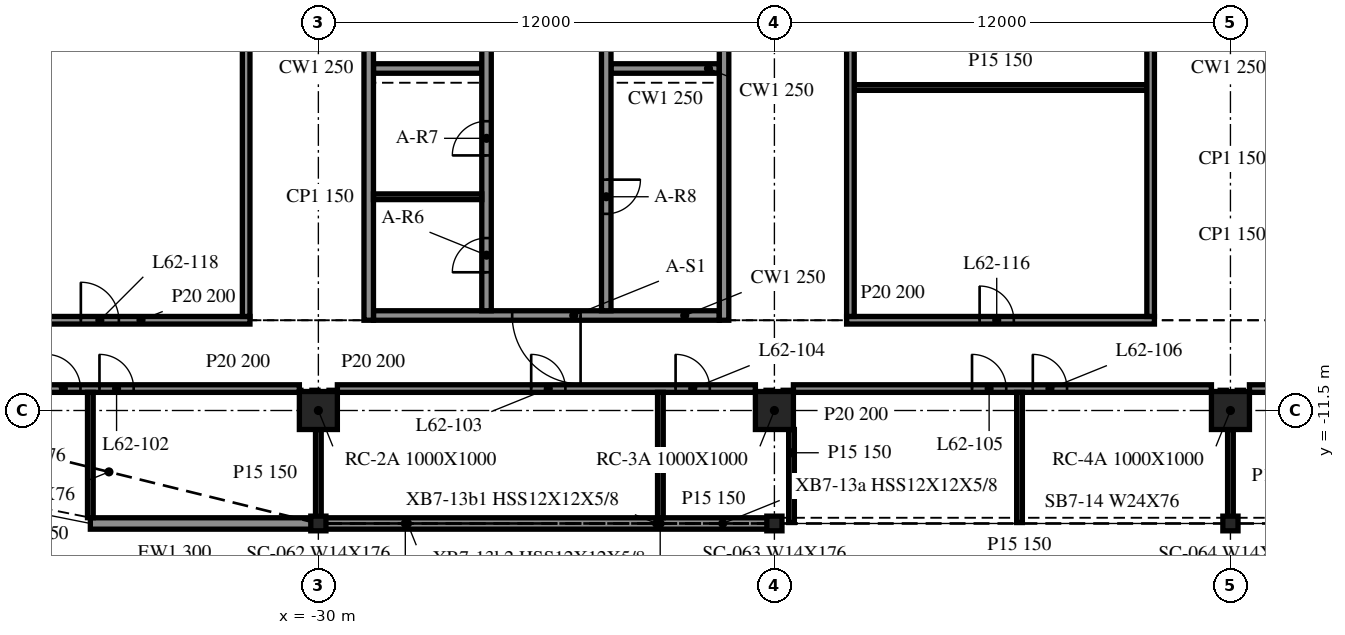
"""IFC4 building model, lengths in metres.
Left out: names, types, materials, properties, quantities, classifications, styles, units other than length and angle.
Written with IfcOpenShell. Run it as: python <this file> out.ifc"""

import sys

from ifc_helpers import new_model, si_unit, direction, frame, frame_2d, origin, origin_2d, place, context, subcontext, project, spatial, rectangle, i_section, extrude, element, fill, save


model = new_model("IFC4")
c1 = context("Model", 3, precision=1e-05, world=origin(), true_north=direction((0.0, 1.0)))
c2 = subcontext(c1, "Body", "Model", "MODEL_VIEW")
j1 = project(units=[si_unit("LENGTHUNIT", "METRE"), si_unit("PLANEANGLEUNIT", "RADIAN")], contexts=[c1])
p1 = place(None, origin())
s1 = spatial("IfcSite", under=j1, at=p1, CompositionType="ELEMENT")
p2 = place(p1, origin())
s2 = spatial("IfcBuilding", under=s1, at=p2, CompositionType="ELEMENT")
p3 = place(p2, frame((0.0, 0.0, 255.2)))
s3 = spatial("IfcBuildingStorey", under=s2, at=p3, CompositionType="ELEMENT", Elevation=255.2)
for number, where, z_axis, x_axis in (
    (1, (-30.0, -11.5, -0.34), (0.0, 0.0, 1.0), (1.0, 0.0, 0.0)),
    (2, (-18.0, -11.5, -0.34), (0.0, 0.0, 1.0), (1.0, 0.0, 0.0)),
    (3, (-6.0, -11.5, -0.34), (0.0, 0.0, 1.0), (1.0, 0.0, 0.0)),
):
    element("IfcColumn", number, at=place(p3, frame(where, z_axis=z_axis, x_axis=x_axis)), inside=s3, PredefinedType="COLUMN", context=c2, shape_type="SweptSolid", body=[
        extrude(rectangle(XDim=1.0, YDim=1.0, at=origin_2d()), origin(), (0.0, 0.0, 1.0), 3.74),
    ])
for number, where, z_axis, x_axis in (
    (4, (-30.0, -14.473, -0.34), (0.0, 0.0, 1.0), (1.0, 0.0, 0.0)),
    (5, (-18.0, -14.473, -0.34), (0.0, 0.0, 1.0), (1.0, 0.0, 0.0)),
    (6, (-6.0, -14.473, -0.34), (0.0, 0.0, 1.0), (1.0, 0.0, 0.0)),
):
    element("IfcColumn", number, at=place(p3, frame(where, z_axis=z_axis, x_axis=x_axis)), inside=s3, PredefinedType="COLUMN", context=c2, shape_type="SweptSolid", body=[
        extrude(i_section(OverallWidth=0.399, OverallDepth=0.386, WebThickness=0.021, FlangeThickness=0.033, at=origin_2d()), origin(), (0.0, 0.0, 1.0), 3.74),
    ])
p4 = place(p3, frame((-36.0, -14.473, 0.0), z_axis=(0.0, 0.0, 1.0), x_axis=(1.0, 0.0, 0.0)))
e7 = element("IfcWall", 7, at=p4, inside=s3, PredefinedType="NOTDEFINED", context=c2, shape_type="SweptSolid", body=[
    extrude(rectangle(XDim=5.99, YDim=0.3, at=frame_2d((2.995, 0.0))), origin(), (0.0, 0.0, 1.0), 3.4),
])
p5 = place(p3, frame((-29.99, -14.473, 0.0), z_axis=(0.0, 0.0, 1.0), x_axis=(1.0, 0.0, 0.0)))
e8 = element("IfcWall", 8, at=p5, inside=s3, PredefinedType="NOTDEFINED", context=c2, shape_type="SweptSolid", body=[
    extrude(rectangle(XDim=11.979, YDim=0.3, at=frame_2d((5.99, 0.0))), origin(), (0.0, 0.0, 1.0), 3.4),
])
for number, where, z_axis, x_axis in (
    (9, (-28.675, 15.125, 0.0), (0.0, 0.0, 1.0), (0.0, -1.0, 0.0)),
    (10, (-19.325, -9.125, 0.0), (0.0, 0.0, 1.0), (0.0, 1.0, 0.0)),
):
    element("IfcWall", number, at=place(p3, frame(where, z_axis=z_axis, x_axis=x_axis)), inside=s3, PredefinedType="SOLIDWALL", context=c2, shape_type="SweptSolid", body=[
        extrude(rectangle(XDim=24.25, YDim=0.25, at=frame_2d((12.125, 0.0))), origin(), (0.0, 0.0, 1.0), 3.4),
    ])
p6 = place(p3, frame((-19.45, -9.0, 0.0), z_axis=(0.0, 0.0, 1.0), x_axis=(-1.0, 0.0, 0.0)))
e11 = element("IfcWall", 11, at=p6, inside=s3, PredefinedType="SOLIDWALL", context=c2, shape_type="SweptSolid", body=[
    extrude(rectangle(XDim=9.1, YDim=0.25, at=frame_2d((4.55, 0.0))), origin(), (0.0, 0.0, 1.0), 3.4),
])
p7 = place(p6, frame((3.65, 0.0, 0.0)))
e12 = element("IfcOpeningElement", 12, at=p7, cuts=e11, PredefinedType="OPENING", context=c2, shape_type="SweptSolid", body=[
    extrude(rectangle(XDim=1.8, YDim=2.1, at=frame_2d((0.9, 1.05))), frame((0.0, 0.135, 0.0), z_axis=(0.0, -1.0, 0.0), x_axis=(1.0, 0.0, 0.0)), (0.0, 0.0, 1.0), 0.27),
])
p8 = place(p3, frame((-25.575, -8.875, 0.0), z_axis=(0.0, 0.0, 1.0), x_axis=(0.0, 1.0, 0.0)))
e13 = element("IfcWall", 13, at=p8, inside=s3, PredefinedType="SOLIDWALL", context=c2, shape_type="SweptSolid", body=[
    extrude(rectangle(XDim=17.5, YDim=0.25, at=frame_2d((8.75, 0.0))), origin(), (0.0, 0.0, 1.0), 3.4),
])
p9 = place(p8, frame((8.7, 0.0, 0.0)))
e14 = element("IfcOpeningElement", 14, at=p9, cuts=e13, PredefinedType="OPENING", context=c2, shape_type="SweptSolid", body=[
    extrude(rectangle(XDim=0.9, YDim=2.1, at=frame_2d((0.45, 1.05))), frame((0.0, 0.135, 0.0), z_axis=(0.0, -1.0, 0.0), x_axis=(1.0, 0.0, 0.0)), (0.0, 0.0, 1.0), 0.27),
])
p10 = place(p8, frame((14.15, 0.0, 0.0)))
e15 = element("IfcOpeningElement", 15, at=p10, cuts=e13, PredefinedType="OPENING", context=c2, shape_type="SweptSolid", body=[
    extrude(rectangle(XDim=0.9, YDim=2.1, at=frame_2d((0.45, 1.05))), frame((0.0, 0.135, 0.0), z_axis=(0.0, -1.0, 0.0), x_axis=(1.0, 0.0, 0.0)), (0.0, 0.0, 1.0), 0.27),
])
p11 = place(p8, frame((1.012, 0.0, 0.0)))
e16 = element("IfcOpeningElement", 16, at=p11, cuts=e13, PredefinedType="OPENING", context=c2, shape_type="SweptSolid", body=[
    extrude(rectangle(XDim=0.9, YDim=2.1, at=frame_2d((0.45, 1.05))), frame((0.0, 0.135, 0.0), z_axis=(0.0, -1.0, 0.0), x_axis=(1.0, 0.0, 0.0)), (0.0, 0.0, 1.0), 0.27),
])
p12 = place(p8, frame((4.087, 0.0, 0.0)))
e17 = element("IfcOpeningElement", 17, at=p12, cuts=e13, PredefinedType="OPENING", context=c2, shape_type="SweptSolid", body=[
    extrude(rectangle(XDim=0.9, YDim=2.1, at=frame_2d((0.45, 1.05))), frame((0.0, 0.135, 0.0), z_axis=(0.0, -1.0, 0.0), x_axis=(1.0, 0.0, 0.0)), (0.0, 0.0, 1.0), 0.27),
])
p13 = place(p3, frame((-22.425, 14.875, 0.0), z_axis=(0.0, 0.0, 1.0), x_axis=(0.0, -1.0, 0.0)))
e18 = element("IfcWall", 18, at=p13, inside=s3, PredefinedType="SOLIDWALL", context=c2, shape_type="SweptSolid", body=[
    extrude(rectangle(XDim=23.75, YDim=0.25, at=frame_2d((11.875, 0.0))), origin(), (0.0, 0.0, 1.0), 3.4),
])
p14 = place(p13, frame((15.225, 0.0, 0.0)))
e19 = element("IfcOpeningElement", 19, at=p14, cuts=e18, PredefinedType="OPENING", context=c2, shape_type="SweptSolid", body=[
    extrude(rectangle(XDim=0.9, YDim=2.1, at=frame_2d((0.45, 1.05))), frame((0.0, 0.135, 0.0), z_axis=(0.0, -1.0, 0.0), x_axis=(1.0, 0.0, 0.0)), (0.0, 0.0, 1.0), 0.27),
])
p15 = place(p13, frame((11.425, 0.0, 0.0)))
e20 = element("IfcOpeningElement", 20, at=p15, cuts=e18, PredefinedType="OPENING", context=c2, shape_type="SweptSolid", body=[
    extrude(rectangle(XDim=0.9, YDim=2.1, at=frame_2d((0.45, 1.05))), frame((0.0, 0.135, 0.0), z_axis=(0.0, -1.0, 0.0), x_axis=(1.0, 0.0, 0.0)), (0.0, 0.0, 1.0), 0.27),
])
p16 = place(p13, frame((7.625, 0.0, 0.0)))
e21 = element("IfcOpeningElement", 21, at=p16, cuts=e18, PredefinedType="OPENING", context=c2, shape_type="SweptSolid", body=[
    extrude(rectangle(XDim=0.9, YDim=2.1, at=frame_2d((0.45, 1.05))), frame((0.0, 0.135, 0.0), z_axis=(0.0, -1.0, 0.0), x_axis=(1.0, 0.0, 0.0)), (0.0, 0.0, 1.0), 0.27),
])
p17 = place(p13, frame((20.3, 0.0, 0.0)))
e22 = element("IfcOpeningElement", 22, at=p17, cuts=e18, PredefinedType="OPENING", context=c2, shape_type="SweptSolid", body=[
    extrude(rectangle(XDim=0.9, YDim=2.1, at=frame_2d((0.45, 1.05))), frame((0.0, 0.135, 0.0), z_axis=(0.0, -1.0, 0.0), x_axis=(1.0, 0.0, 0.0)), (0.0, 0.0, 1.0), 0.27),
])
p18 = place(p13, frame((3.847, 0.0, 0.0)))
e23 = element("IfcOpeningElement", 23, at=p18, cuts=e18, PredefinedType="OPENING", context=c2, shape_type="SweptSolid", body=[
    extrude(rectangle(XDim=0.9, YDim=2.1, at=frame_2d((0.45, 1.05))), frame((0.0, 0.135, 0.0), z_axis=(0.0, -1.0, 0.0), x_axis=(1.0, 0.0, 0.0)), (0.0, 0.0, 1.0), 0.27),
])
p19 = place(p13, frame((0.772, 0.0, 0.0)))
e24 = element("IfcOpeningElement", 24, at=p19, cuts=e18, PredefinedType="OPENING", context=c2, shape_type="SweptSolid", body=[
    extrude(rectangle(XDim=0.9, YDim=2.1, at=frame_2d((0.45, 1.05))), frame((0.0, 0.135, 0.0), z_axis=(0.0, -1.0, 0.0), x_axis=(1.0, 0.0, 0.0)), (0.0, 0.0, 1.0), 0.27),
])
for number, where, z_axis, x_axis in (
    (25, (-28.55, -2.5, 0.0), (0.0, 0.0, 1.0), (1.0, 0.0, 0.0)),
    (26, (-22.3, -2.5, 0.0), (0.0, 0.0, 1.0), (1.0, 0.0, 0.0)),
):
    element("IfcWall", number, at=place(p3, frame(where, z_axis=z_axis, x_axis=x_axis)), inside=s3, PredefinedType="SOLIDWALL", context=c2, shape_type="SweptSolid", body=[
        extrude(rectangle(XDim=2.85, YDim=0.25, at=frame_2d((1.425, 0.0))), origin(), (0.0, 0.0, 1.0), 3.4),
    ])
p20 = place(p3, frame((-28.55, -5.875, 0.0), z_axis=(0.0, 0.0, 1.0), x_axis=(1.0, 0.0, 0.0)))
e27 = element("IfcWall", 27, at=p20, inside=s3, PredefinedType="PARTITIONING", context=c2, shape_type="SweptSolid", body=[
    extrude(rectangle(XDim=2.85, YDim=0.15, at=frame_2d((1.425, 0.0))), origin(), (0.0, 0.0, 1.0), 3.4),
])
p21 = place(p3, frame((-41.26, -10.923, 0.0), z_axis=(0.0, 0.0, 1.0), x_axis=(1.0, 0.0, 0.0)))
e28 = element("IfcWall", 28, at=p21, inside=s3, PredefinedType="PARTITIONING", context=c2, shape_type="SweptSolid", body=[
    extrude(rectangle(XDim=10.76, YDim=0.2, at=frame_2d((5.38, 0.0))), origin(), (0.0, 0.0, 1.0), 3.4),
])
p22 = place(p21, frame((4.1, 0.0, 0.0)))
e29 = element("IfcOpeningElement", 29, at=p22, cuts=e28, PredefinedType="OPENING", context=c2, shape_type="SweptSolid", body=[
    extrude(rectangle(XDim=0.9, YDim=2.1, at=frame_2d((0.45, 1.05))), frame((0.0, 0.11, 0.0), z_axis=(0.0, -1.0, 0.0), x_axis=(1.0, 0.0, 0.0)), (0.0, 0.0, 1.0), 0.22),
])
p23 = place(p21, frame((5.5, 0.0, 0.0)))
e30 = element("IfcOpeningElement", 30, at=p23, cuts=e28, PredefinedType="OPENING", context=c2, shape_type="SweptSolid", body=[
    extrude(rectangle(XDim=0.9, YDim=2.1, at=frame_2d((0.45, 1.05))), frame((0.0, 0.11, 0.0), z_axis=(0.0, -1.0, 0.0), x_axis=(1.0, 0.0, 0.0)), (0.0, 0.0, 1.0), 0.22),
])
p24 = place(p3, frame((-29.5, -10.923, 0.0), z_axis=(0.0, 0.0, 1.0), x_axis=(1.0, 0.0, 0.0)))
e31 = element("IfcWall", 31, at=p24, inside=s3, PredefinedType="PARTITIONING", context=c2, shape_type="SweptSolid", body=[
    extrude(rectangle(XDim=11.0, YDim=0.2, at=frame_2d((5.5, 0.0))), origin(), (0.0, 0.0, 1.0), 3.4),
])
p25 = place(p24, frame((5.1, 0.0, 0.0)))
e32 = element("IfcOpeningElement", 32, at=p25, cuts=e31, PredefinedType="OPENING", context=c2, shape_type="SweptSolid", body=[
    extrude(rectangle(XDim=0.9, YDim=2.1, at=frame_2d((0.45, 1.05))), frame((0.0, 0.11, 0.0), z_axis=(0.0, -1.0, 0.0), x_axis=(1.0, 0.0, 0.0)), (0.0, 0.0, 1.0), 0.22),
])
p26 = place(p24, frame((8.9, 0.0, 0.0)))
e33 = element("IfcOpeningElement", 33, at=p26, cuts=e31, PredefinedType="OPENING", context=c2, shape_type="SweptSolid", body=[
    extrude(rectangle(XDim=0.9, YDim=2.1, at=frame_2d((0.45, 1.05))), frame((0.0, 0.11, 0.0), z_axis=(0.0, -1.0, 0.0), x_axis=(1.0, 0.0, 0.0)), (0.0, 0.0, 1.0), 0.22),
])
p27 = place(p3, frame((-17.5, -10.923, 0.0), z_axis=(0.0, 0.0, 1.0), x_axis=(1.0, 0.0, 0.0)))
e34 = element("IfcWall", 34, at=p27, inside=s3, PredefinedType="PARTITIONING", context=c2, shape_type="SweptSolid", body=[
    extrude(rectangle(XDim=11.0, YDim=0.2, at=frame_2d((5.5, 0.0))), origin(), (0.0, 0.0, 1.0), 3.4),
])
p28 = place(p27, frame((4.7, 0.0, 0.0)))
e35 = element("IfcOpeningElement", 35, at=p28, cuts=e34, PredefinedType="OPENING", context=c2, shape_type="SweptSolid", body=[
    extrude(rectangle(XDim=0.9, YDim=2.1, at=frame_2d((0.45, 1.05))), frame((0.0, 0.11, 0.0), z_axis=(0.0, -1.0, 0.0), x_axis=(1.0, 0.0, 0.0)), (0.0, 0.0, 1.0), 0.22),
])
p29 = place(p27, frame((6.3, 0.0, 0.0)))
e36 = element("IfcOpeningElement", 36, at=p29, cuts=e34, PredefinedType="OPENING", context=c2, shape_type="SweptSolid", body=[
    extrude(rectangle(XDim=0.9, YDim=2.1, at=frame_2d((0.45, 1.05))), frame((0.0, 0.11, 0.0), z_axis=(0.0, -1.0, 0.0), x_axis=(1.0, 0.0, 0.0)), (0.0, 0.0, 1.0), 0.22),
])
p30 = place(p3, frame((-5.5, -10.923, 0.0), z_axis=(0.0, 0.0, 1.0), x_axis=(1.0, 0.0, 0.0)))
e37 = element("IfcWall", 37, at=p30, inside=s3, PredefinedType="PARTITIONING", context=c2, shape_type="SweptSolid", body=[
    extrude(rectangle(XDim=11.0, YDim=0.2, at=frame_2d((5.5, 0.0))), origin(), (0.0, 0.0, 1.0), 3.4),
])
p31 = place(p30, frame((5.1, 0.0, 0.0)))
e38 = element("IfcOpeningElement", 38, at=p31, cuts=e37, PredefinedType="OPENING", context=c2, shape_type="SweptSolid", body=[
    extrude(rectangle(XDim=0.9, YDim=2.1, at=frame_2d((0.45, 1.05))), frame((0.0, 0.11, 0.0), z_axis=(0.0, -1.0, 0.0), x_axis=(1.0, 0.0, 0.0)), (0.0, 0.0, 1.0), 0.22),
])
p32 = place(p30, frame((8.9, 0.0, 0.0)))
e39 = element("IfcOpeningElement", 39, at=p32, cuts=e37, PredefinedType="OPENING", context=c2, shape_type="SweptSolid", body=[
    extrude(rectangle(XDim=0.9, YDim=2.1, at=frame_2d((0.45, 1.05))), frame((0.0, 0.11, 0.0), z_axis=(0.0, -1.0, 0.0), x_axis=(1.0, 0.0, 0.0)), (0.0, 0.0, 1.0), 0.22),
])
p33 = place(p3, frame((-39.55, -9.125, 0.0), z_axis=(0.0, 0.0, 1.0), x_axis=(1.0, 0.0, 0.0)))
e40 = element("IfcWall", 40, at=p33, inside=s3, PredefinedType="PARTITIONING", context=c2, shape_type="SweptSolid", body=[
    extrude(rectangle(XDim=7.75, YDim=0.2, at=frame_2d((3.875, 0.0))), origin(), (0.0, 0.0, 1.0), 3.4),
])
p34 = place(p33, frame((3.3, 0.0, 0.0)))
e41 = element("IfcOpeningElement", 41, at=p34, cuts=e40, PredefinedType="OPENING", context=c2, shape_type="SweptSolid", body=[
    extrude(rectangle(XDim=1.0, YDim=2.1, at=frame_2d((0.5, 1.05))), frame((0.0, 0.11, 0.0), z_axis=(0.0, -1.0, 0.0), x_axis=(1.0, 0.0, 0.0)), (0.0, 0.0, 1.0), 0.22),
])
p35 = place(p3, frame((-16.1, -9.125, 0.0), z_axis=(0.0, 0.0, 1.0), x_axis=(1.0, 0.0, 0.0)))
e42 = element("IfcWall", 42, at=p35, inside=s3, PredefinedType="PARTITIONING", context=c2, shape_type="SweptSolid", body=[
    extrude(rectangle(XDim=8.1, YDim=0.2, at=frame_2d((4.05, 0.0))), origin(), (0.0, 0.0, 1.0), 3.4),
])
p36 = place(p35, frame((3.5, 0.0, 0.0)))
e43 = element("IfcOpeningElement", 43, at=p36, cuts=e42, PredefinedType="OPENING", context=c2, shape_type="SweptSolid", body=[
    extrude(rectangle(XDim=0.9, YDim=2.1, at=frame_2d((0.45, 1.05))), frame((0.0, 0.11, 0.0), z_axis=(0.0, -1.0, 0.0), x_axis=(1.0, 0.0, 0.0)), (0.0, 0.0, 1.0), 0.22),
])
p37 = place(p3, frame((-15.9, -3.0, 0.0), z_axis=(0.0, 0.0, 1.0), x_axis=(1.0, 0.0, 0.0)))
e44 = element("IfcWall", 44, at=p37, inside=s3, PredefinedType="PARTITIONING", context=c2, shape_type="SweptSolid", body=[
    extrude(rectangle(XDim=7.7, YDim=0.15, at=frame_2d((3.85, 0.0))), origin(), (0.0, 0.0, 1.0), 3.4),
])
p38 = place(p3, frame((-36.0, -14.32, 0.0), z_axis=(0.0, 0.0, 1.0), x_axis=(0.0, 1.0, 0.0)))
e45 = element("IfcWall", 45, at=p38, inside=s3, PredefinedType="PARTITIONING", context=c2, shape_type="SweptSolid", body=[
    extrude(rectangle(XDim=3.297, YDim=0.15, at=frame_2d((1.648, 0.0))), origin(), (0.0, 0.0, 1.0), 3.4),
])
p39 = place(p3, frame((-31.9, -9.025, 0.0), z_axis=(0.0, 0.0, 1.0), x_axis=(0.0, 1.0, 0.0)))
e46 = element("IfcWall", 46, at=p39, inside=s3, PredefinedType="PARTITIONING", context=c2, shape_type="SweptSolid", body=[
    extrude(rectangle(XDim=24.05, YDim=0.2, at=frame_2d((12.025, 0.0))), origin(), (0.0, 0.0, 1.0), 3.4),
])
p40 = place(p3, frame((-30.0, -14.323, 0.0), z_axis=(0.0, 0.0, 1.0), x_axis=(0.0, 1.0, 0.0)))
e47 = element("IfcWall", 47, at=p40, inside=s3, PredefinedType="PARTITIONING", context=c2, shape_type="SweptSolid", body=[
    extrude(rectangle(XDim=2.323, YDim=0.15, at=frame_2d((1.162, 0.0))), origin(), (0.0, 0.0, 1.0), 2.401),
])
p41 = place(p3, frame((-21.0, -14.323, 0.0), z_axis=(0.0, 0.0, 1.0), x_axis=(0.0, 1.0, 0.0)))
e48 = element("IfcWall", 48, at=p41, inside=s3, PredefinedType="PARTITIONING", context=c2, shape_type="SweptSolid", body=[
    extrude(rectangle(XDim=3.3, YDim=0.15, at=frame_2d((1.65, 0.0))), origin(), (0.0, 0.0, 1.0), 3.4),
])
p42 = place(p3, frame((-17.55, -14.448, 0.0), z_axis=(0.0, 0.0, 1.0), x_axis=(0.0, 1.0, 0.0)))
e49 = element("IfcWall", 49, at=p42, inside=s3, PredefinedType="PARTITIONING", context=c2, shape_type="SweptSolid", body=[
    extrude(rectangle(XDim=2.448, YDim=0.15, at=frame_2d((1.224, 0.0))), origin(), (0.0, 0.0, 1.0), 3.4),
])
p43 = place(p3, frame((-16.0, -9.025, 0.0), z_axis=(0.0, 0.0, 1.0), x_axis=(0.0, 1.0, 0.0)))
e50 = element("IfcWall", 50, at=p43, inside=s3, PredefinedType="PARTITIONING", context=c2, shape_type="SweptSolid", body=[
    extrude(rectangle(XDim=24.05, YDim=0.2, at=frame_2d((12.025, 0.0))), origin(), (0.0, 0.0, 1.0), 3.4),
])
p44 = place(p43, frame((11.5, 0.0, 0.0)))
e51 = element("IfcOpeningElement", 51, at=p44, cuts=e50, PredefinedType="OPENING", context=c2, shape_type="SweptSolid", body=[
    extrude(rectangle(XDim=0.9, YDim=2.1, at=frame_2d((0.45, 1.05))), frame((0.0, 0.11, 0.0), z_axis=(0.0, -1.0, 0.0), x_axis=(1.0, 0.0, 0.0)), (0.0, 0.0, 1.0), 0.22),
])
p45 = place(p3, frame((-11.55, -14.448, 0.0), z_axis=(0.0, 0.0, 1.0), x_axis=(0.0, 1.0, 0.0)))
e52 = element("IfcWall", 52, at=p45, inside=s3, PredefinedType="PARTITIONING", context=c2, shape_type="SweptSolid", body=[
    extrude(rectangle(XDim=3.425, YDim=0.15, at=frame_2d((1.712, 0.0))), origin(), (0.0, 0.0, 1.0), 3.4),
])
p46 = place(p3, frame((-8.1, -9.025, 0.0), z_axis=(0.0, 0.0, 1.0), x_axis=(0.0, 1.0, 0.0)))
e53 = element("IfcWall", 53, at=p46, inside=s3, PredefinedType="PARTITIONING", context=c2, shape_type="SweptSolid", body=[
    extrude(rectangle(XDim=24.05, YDim=0.2, at=frame_2d((12.025, 0.0))), origin(), (0.0, 0.0, 1.0), 3.4),
])
p47 = place(p3, frame((-6.0, -14.448, 0.0), z_axis=(0.0, 0.0, 1.0), x_axis=(0.0, 1.0, 0.0)))
e54 = element("IfcWall", 54, at=p47, inside=s3, PredefinedType="PARTITIONING", context=c2, shape_type="SweptSolid", body=[
    extrude(rectangle(XDim=2.448, YDim=0.15, at=frame_2d((1.224, 0.0))), origin(), (0.0, 0.0, 1.0), 2.401),
])
p48 = place(p7, origin())
e55 = element("IfcDoor", 55, at=p48, inside=s3, OperationType="DOUBLE_DOOR_SINGLE_SWING", PredefinedType="DOOR", context=c2, shape_type="SweptSolid", body=[
    extrude(rectangle(XDim=1.8, YDim=2.1, at=frame_2d((0.9, 1.05))), frame((0.0, 0.025, 0.0), z_axis=(0.0, -1.0, 0.0), x_axis=(1.0, 0.0, 0.0)), (0.0, 0.0, 1.0), 0.05),
])
fill(e12, e55)
p49 = place(p11, origin())
e56 = element("IfcDoor", 56, at=p49, inside=s3, OperationType="SINGLE_SWING_RIGHT", PredefinedType="DOOR", context=c2, shape_type="SweptSolid", body=[
    extrude(rectangle(XDim=0.9, YDim=2.1, at=frame_2d((0.45, 1.05))), frame((0.0, 0.025, 0.0), z_axis=(0.0, -1.0, 0.0), x_axis=(1.0, 0.0, 0.0)), (0.0, 0.0, 1.0), 0.05),
])
fill(e16, e56)
p50 = place(p12, origin())
e57 = element("IfcDoor", 57, at=p50, inside=s3, OperationType="SINGLE_SWING_LEFT", PredefinedType="DOOR", context=c2, shape_type="SweptSolid", body=[
    extrude(rectangle(XDim=0.9, YDim=2.1, at=frame_2d((0.45, 1.05))), frame((0.0, 0.025, 0.0), z_axis=(0.0, -1.0, 0.0), x_axis=(1.0, 0.0, 0.0)), (0.0, 0.0, 1.0), 0.05),
])
fill(e17, e57)
p51 = place(p17, origin())
e58 = element("IfcDoor", 58, at=p51, inside=s3, OperationType="SINGLE_SWING_RIGHT", PredefinedType="DOOR", context=c2, shape_type="SweptSolid", body=[
    extrude(rectangle(XDim=0.9, YDim=2.1, at=frame_2d((0.45, 1.05))), frame((0.0, 0.025, 0.0), z_axis=(0.0, -1.0, 0.0), x_axis=(1.0, 0.0, 0.0)), (0.0, 0.0, 1.0), 0.05),
])
fill(e22, e58)
p52 = place(p22, origin())
e59 = element("IfcDoor", 59, at=p52, inside=s3, OperationType="SINGLE_SWING_RIGHT", PredefinedType="DOOR", context=c2, shape_type="SweptSolid", body=[
    extrude(rectangle(XDim=0.9, YDim=2.1, at=frame_2d((0.45, 1.05))), frame((0.0, 0.025, 0.0), z_axis=(0.0, -1.0, 0.0), x_axis=(1.0, 0.0, 0.0)), (0.0, 0.0, 1.0), 0.05),
])
fill(e29, e59)
p53 = place(p23, origin())
e60 = element("IfcDoor", 60, at=p53, inside=s3, OperationType="SINGLE_SWING_LEFT", PredefinedType="DOOR", context=c2, shape_type="SweptSolid", body=[
    extrude(rectangle(XDim=0.9, YDim=2.1, at=frame_2d((0.45, 1.05))), frame((0.0, 0.025, 0.0), z_axis=(0.0, -1.0, 0.0), x_axis=(1.0, 0.0, 0.0)), (0.0, 0.0, 1.0), 0.05),
])
fill(e30, e60)
p54 = place(p25, origin())
e61 = element("IfcDoor", 61, at=p54, inside=s3, OperationType="SINGLE_SWING_LEFT", PredefinedType="DOOR", context=c2, shape_type="SweptSolid", body=[
    extrude(rectangle(XDim=0.9, YDim=2.1, at=frame_2d((0.45, 1.05))), frame((0.0, 0.025, 0.0), z_axis=(0.0, -1.0, 0.0), x_axis=(1.0, 0.0, 0.0)), (0.0, 0.0, 1.0), 0.05),
])
fill(e32, e61)
p55 = place(p26, origin())
e62 = element("IfcDoor", 62, at=p55, inside=s3, OperationType="SINGLE_SWING_LEFT", PredefinedType="DOOR", context=c2, shape_type="SweptSolid", body=[
    extrude(rectangle(XDim=0.9, YDim=2.1, at=frame_2d((0.45, 1.05))), frame((0.0, 0.025, 0.0), z_axis=(0.0, -1.0, 0.0), x_axis=(1.0, 0.0, 0.0)), (0.0, 0.0, 1.0), 0.05),
])
fill(e33, e62)
p56 = place(p28, origin())
e63 = element("IfcDoor", 63, at=p56, inside=s3, OperationType="SINGLE_SWING_RIGHT", PredefinedType="DOOR", context=c2, shape_type="SweptSolid", body=[
    extrude(rectangle(XDim=0.9, YDim=2.1, at=frame_2d((0.45, 1.05))), frame((0.0, 0.025, 0.0), z_axis=(0.0, -1.0, 0.0), x_axis=(1.0, 0.0, 0.0)), (0.0, 0.0, 1.0), 0.05),
])
fill(e35, e63)
p57 = place(p29, origin())
e64 = element("IfcDoor", 64, at=p57, inside=s3, OperationType="SINGLE_SWING_LEFT", PredefinedType="DOOR", context=c2, shape_type="SweptSolid", body=[
    extrude(rectangle(XDim=0.9, YDim=2.1, at=frame_2d((0.45, 1.05))), frame((0.0, 0.025, 0.0), z_axis=(0.0, -1.0, 0.0), x_axis=(1.0, 0.0, 0.0)), (0.0, 0.0, 1.0), 0.05),
])
fill(e36, e64)
p58 = place(p36, origin())
e65 = element("IfcDoor", 65, at=p58, inside=s3, OperationType="SINGLE_SWING_LEFT", PredefinedType="DOOR", context=c2, shape_type="SweptSolid", body=[
    extrude(rectangle(XDim=0.9, YDim=2.1, at=frame_2d((0.45, 1.05))), frame((0.0, 0.025, 0.0), z_axis=(0.0, -1.0, 0.0), x_axis=(1.0, 0.0, 0.0)), (0.0, 0.0, 1.0), 0.05),
])
fill(e43, e65)
p59 = place(p34, origin())
e66 = element("IfcDoor", 66, at=p59, inside=s3, OperationType="SINGLE_SWING_LEFT", PredefinedType="DOOR", context=c2, shape_type="SweptSolid", body=[
    extrude(rectangle(XDim=1.0, YDim=2.1, at=frame_2d((0.5, 1.05))), frame((0.0, 0.025, 0.0), z_axis=(0.0, -1.0, 0.0), x_axis=(1.0, 0.0, 0.0)), (0.0, 0.0, 1.0), 0.05),
])
fill(e41, e66)
save(model, sys.argv[1])
